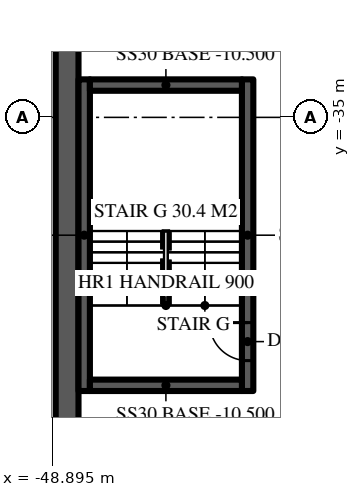
"""IFC4 building model, lengths in metres.
Left out: names, types, materials, properties, quantities, classifications, styles, units other than length and angle.
Written with IfcOpenShell. Run it as: python <this file> out.ifc"""

import sys

from ifc_helpers import new_model, si_unit, direction, frame, frame_2d, origin, place, context, subcontext, project, spatial, rectangle, extrude, element, fill, save


model = new_model("IFC4")
c1 = context("Model", 3, precision=1e-05, world=origin(), true_north=direction((0.0, 1.0)))
c2 = subcontext(c1, "Body", "Model", "MODEL_VIEW")
j1 = project(units=[si_unit("LENGTHUNIT", "METRE"), si_unit("PLANEANGLEUNIT", "RADIAN")], contexts=[c1])
p1 = place(None, origin())
s1 = spatial("IfcSite", under=j1, at=p1, CompositionType="ELEMENT")
p2 = place(p1, origin())
s2 = spatial("IfcBuilding", under=s1, at=p2, CompositionType="ELEMENT")
p3 = place(p2, frame((0.0, 0.0, -10.0)))
s3 = spatial("IfcBuildingStorey", under=s2, at=p3, CompositionType="ELEMENT", Elevation=-10.0)
p4 = place(p3, frame((-48.5, 48.2, -0.5), z_axis=(0.0, 0.0, 1.0), x_axis=(0.0, -1.0, 0.0)))
e1 = element("IfcWall", 1, at=p4, inside=s3, PredefinedType="SOLIDWALL", context=c2, shape_type="SweptSolid", body=[
    extrude(rectangle(XDim=96.4, YDim=0.6, at=frame_2d((48.2, 0.0))), origin(), (0.0, 0.0, 1.0), 10.1),
])
p5 = place(p3, frame((-43.75, -42.2, -0.5), z_axis=(0.0, 0.0, 1.0), x_axis=(0.0, 1.0, 0.0)))
e2 = element("IfcWall", 2, at=p5, inside=s3, PredefinedType="SOLIDWALL", context=c2, shape_type="SweptSolid", body=[
    extrude(rectangle(XDim=8.2, YDim=0.3, at=frame_2d((4.1, 0.0))), origin(), (0.0, 0.0, 1.0), 5.2),
])
p6 = place(p5, frame((0.8, 0.0, 0.5)))
e3 = element("IfcOpeningElement", 3, at=p6, cuts=e2, PredefinedType="OPENING", context=c2, shape_type="SweptSolid", body=[
    extrude(rectangle(XDim=1.0, YDim=2.2, at=frame_2d((0.5, 1.1))), frame((0.0, 0.16, 0.0), z_axis=(0.0, -1.0, 0.0), x_axis=(1.0, 0.0, 0.0)), (0.0, 0.0, 1.0), 0.32),
])
p7 = place(p3, frame((-48.05, -34.0, -0.5), z_axis=(0.0, 0.0, 1.0), x_axis=(0.0, -1.0, 0.0)))
e4 = element("IfcWall", 4, at=p7, inside=s3, PredefinedType="SOLIDWALL", context=c2, shape_type="SweptSolid", body=[
    extrude(rectangle(XDim=8.2, YDim=0.3, at=frame_2d((4.1, 0.0))), origin(), (0.0, 0.0, 1.0), 5.2),
])
for number, where, z_axis, x_axis in (
    (5, (-43.9, -42.05, -0.5), (0.0, 0.0, 1.0), (-1.0, 0.0, 0.0)),
    (6, (-47.9, -34.15, -0.5), (0.0, 0.0, 1.0), (1.0, 0.0, 0.0)),
):
    element("IfcWall", number, at=place(p3, frame(where, z_axis=z_axis, x_axis=x_axis)), inside=s3, PredefinedType="SOLIDWALL", context=c2, shape_type="SweptSolid", body=[
        extrude(rectangle(XDim=4.0, YDim=0.3, at=frame_2d((2.0, 0.0))), origin(), (0.0, 0.0, 1.0), 5.2),
    ])
p8 = place(p6, origin())
e7 = element("IfcDoor", 7, at=p8, inside=s3, OperationType="SINGLE_SWING_RIGHT", PredefinedType="DOOR", context=c2, shape_type="SweptSolid", body=[
    extrude(rectangle(XDim=1.0, YDim=2.2, at=frame_2d((0.5, 1.1))), frame((0.0, 0.025, 0.0), z_axis=(0.0, -1.0, 0.0), x_axis=(1.0, 0.0, 0.0)), (0.0, 0.0, 1.0), 0.05),
])
fill(e3, e7)
save(model, sys.argv[1])
